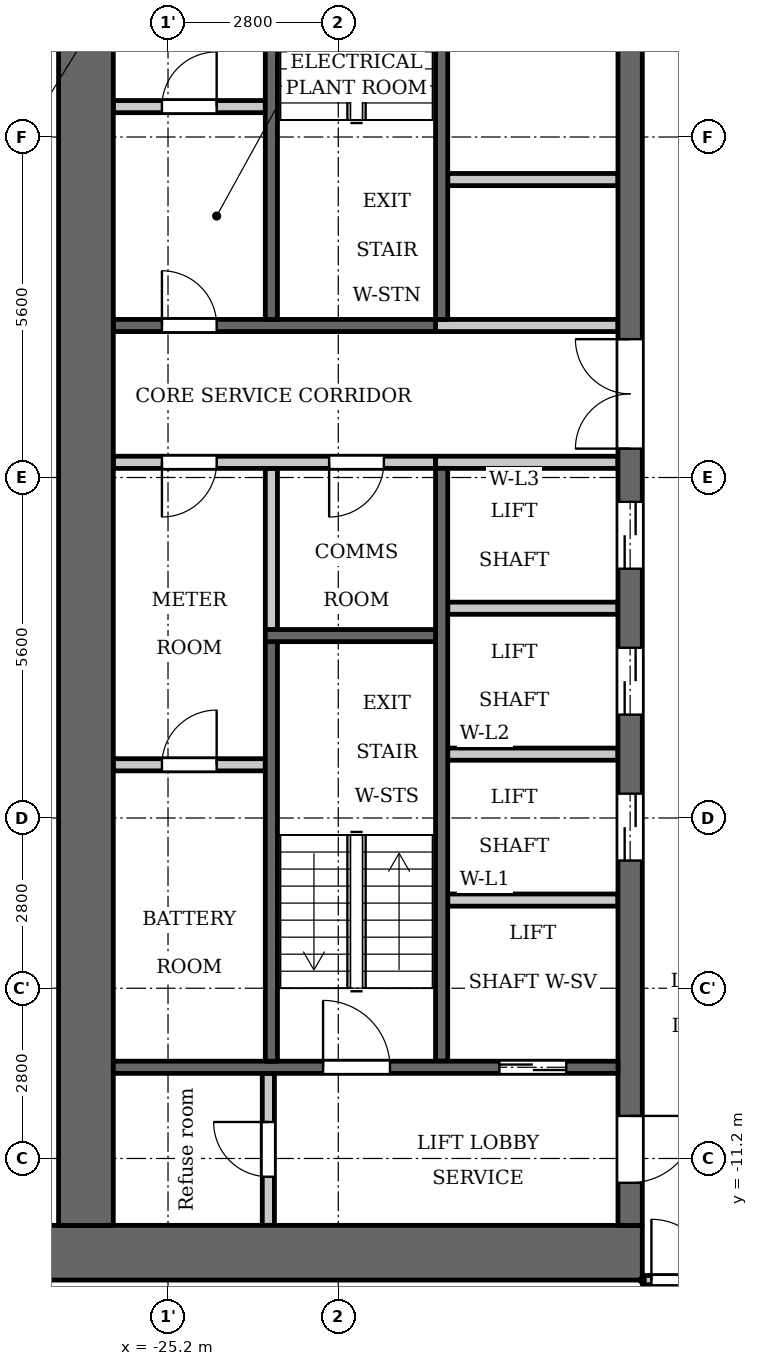
"""IFC4 building model, lengths in metres.
Left out: names, types, materials, properties, quantities, classifications, styles, units other than length and angle.
Written with IfcOpenShell. Run it as: python <this file> out.ifc"""

import sys

from ifc_helpers import new_model, si_unit, direction, frame, frame_2d, origin, place, context, subcontext, project, spatial, rectangle, extrude, element, fill, save


model = new_model("IFC4")
c1 = context("Model", 3, precision=1e-05, world=origin(), true_north=direction((0.0, 1.0)))
c2 = subcontext(c1, "Body", "Model", "MODEL_VIEW")
j1 = project(units=[si_unit("LENGTHUNIT", "METRE"), si_unit("PLANEANGLEUNIT", "RADIAN")], contexts=[c1])
p1 = place(None, origin())
s1 = spatial("IfcSite", under=j1, at=p1, CompositionType="ELEMENT")
p2 = place(p1, origin())
s2 = spatial("IfcBuilding", under=s1, at=p2, CompositionType="ELEMENT")
p3 = place(p2, frame((0.0, 0.0, 121.8)))
s3 = spatial("IfcBuildingStorey", under=s2, at=p3, CompositionType="ELEMENT", Elevation=121.8)
p4 = place(p3, frame((-23.5, -2.5, 0.0), z_axis=(0.0, 0.0, 1.0), x_axis=(0.0, 1.0, 0.0)))
e1 = element("IfcWall", 1, at=p4, inside=s3, PredefinedType="PARTITIONING", context=c2, shape_type="SweptSolid", body=[
    extrude(rectangle(XDim=2.65, YDim=0.2, at=frame_2d((1.325, 0.0))), origin(), (0.0, 0.0, 1.0), 3.15),
])
p5 = place(p3, frame((-20.7, 2.6, 0.0), z_axis=(0.0, 0.0, 1.0), x_axis=(0.0, 1.0, 0.0)))
e2 = element("IfcWall", 2, at=p5, inside=s3, PredefinedType="SHEAR", context=c2, shape_type="SweptSolid", body=[
    extrude(rectangle(XDim=7.0, YDim=0.2, at=frame_2d((3.5, 0.0))), origin(), (0.0, 0.0, 1.0), 3.15),
])
p6 = place(p3, frame((-20.7, -9.6, 0.0), z_axis=(0.0, 0.0, 1.0), x_axis=(0.0, 1.0, 0.0)))
e3 = element("IfcWall", 3, at=p6, inside=s3, PredefinedType="SHEAR", context=c2, shape_type="SweptSolid", body=[
    extrude(rectangle(XDim=9.75, YDim=0.2, at=frame_2d((4.875, 0.0))), origin(), (0.0, 0.0, 1.0), 3.15),
])
p7 = place(p3, frame((-20.8, 2.5, 0.0), z_axis=(0.0, 0.0, 1.0), x_axis=(-1.0, 0.0, 0.0)))
e4 = element("IfcWall", 4, at=p7, inside=s3, PredefinedType="SHEAR", context=c2, shape_type="SweptSolid", body=[
    extrude(rectangle(XDim=5.3, YDim=0.2, at=frame_2d((2.65, 0.0))), origin(), (0.0, 0.0, 1.0), 3.15),
])
p8 = place(p7, frame((3.6, 0.0, 0.0)))
e5 = element("IfcOpeningElement", 5, at=p8, cuts=e4, PredefinedType="OPENING", context=c2, shape_type="SweptSolid", body=[
    extrude(rectangle(XDim=0.9, YDim=2.1, at=frame_2d((0.45, 1.05))), frame((0.0, 0.11, 0.0), z_axis=(0.0, -1.0, 0.0), x_axis=(1.0, 0.0, 0.0)), (0.0, 0.0, 1.0), 0.22),
])
p9 = place(p3, frame((-20.8, 0.25, 0.0), z_axis=(0.0, 0.0, 1.0), x_axis=(-1.0, 0.0, 0.0)))
e6 = element("IfcWall", 6, at=p9, inside=s3, PredefinedType="PARTITIONING", context=c2, shape_type="SweptSolid", body=[
    extrude(rectangle(XDim=5.3, YDim=0.2, at=frame_2d((2.65, 0.0))), origin(), (0.0, 0.0, 1.0), 3.15),
])
p10 = place(p9, frame((0.85, 0.0, 0.0)))
e7 = element("IfcOpeningElement", 7, at=p10, cuts=e6, PredefinedType="OPENING", context=c2, shape_type="SweptSolid", body=[
    extrude(rectangle(XDim=0.9, YDim=2.1, at=frame_2d((0.45, 1.05))), frame((0.0, 0.11, 0.0), z_axis=(0.0, -1.0, 0.0), x_axis=(1.0, 0.0, 0.0)), (0.0, 0.0, 1.0), 0.22),
])
p11 = place(p9, frame((3.6, 0.0, 0.0)))
e8 = element("IfcOpeningElement", 8, at=p11, cuts=e6, PredefinedType="OPENING", context=c2, shape_type="SweptSolid", body=[
    extrude(rectangle(XDim=0.9, YDim=2.1, at=frame_2d((0.45, 1.05))), frame((0.0, 0.11, 0.0), z_axis=(0.0, -1.0, 0.0), x_axis=(1.0, 0.0, 0.0)), (0.0, 0.0, 1.0), 0.22),
])
p12 = place(p3, frame((-17.4, -12.75, 0.0), z_axis=(0.0, 0.0, 1.0), x_axis=(-1.0, 0.0, 0.0)))
e9 = element("IfcWall", 9, at=p12, inside=s3, PredefinedType="SHEAR", context=c2, shape_type="SweptSolid", body=[
    extrude(rectangle(XDim=10.4, YDim=0.9, at=frame_2d((5.2, 0.0))), origin(), (0.0, 0.0, 1.0), 3.15),
])
p13 = place(p3, frame((-17.6, -12.3, 0.0), z_axis=(0.0, 0.0, 1.0), x_axis=(0.0, 1.0, 0.0)))
e10 = element("IfcWall", 10, at=p13, inside=s3, PredefinedType="SHEAR", context=c2, shape_type="SweptSolid", body=[
    extrude(rectangle(XDim=24.6, YDim=0.4, at=frame_2d((12.3, 0.0))), origin(), (0.0, 0.0, 1.0), 3.15),
])
p14 = place(p13, frame((6.0, 0.0, 0.0)))
e11 = element("IfcOpeningElement", 11, at=p14, cuts=e10, PredefinedType="OPENING", context=c2, shape_type="SweptSolid", body=[
    extrude(rectangle(XDim=1.1, YDim=2.1, at=frame_2d((0.55, 1.05))), frame((0.0, 0.21, 0.0), z_axis=(0.0, -1.0, 0.0), x_axis=(1.0, 0.0, 0.0)), (0.0, 0.0, 1.0), 0.42),
])
p15 = place(p13, frame((8.4, 0.0, 0.0)))
e12 = element("IfcOpeningElement", 12, at=p15, cuts=e10, PredefinedType="OPENING", context=c2, shape_type="SweptSolid", body=[
    extrude(rectangle(XDim=1.1, YDim=2.1, at=frame_2d((0.55, 1.05))), frame((0.0, 0.21, 0.0), z_axis=(0.0, -1.0, 0.0), x_axis=(1.0, 0.0, 0.0)), (0.0, 0.0, 1.0), 0.42),
])
p16 = place(p13, frame((10.8, 0.0, 0.0)))
e13 = element("IfcOpeningElement", 13, at=p16, cuts=e10, PredefinedType="OPENING", context=c2, shape_type="SweptSolid", body=[
    extrude(rectangle(XDim=1.1, YDim=2.1, at=frame_2d((0.55, 1.05))), frame((0.0, 0.21, 0.0), z_axis=(0.0, -1.0, 0.0), x_axis=(1.0, 0.0, 0.0)), (0.0, 0.0, 1.0), 0.42),
])
p17 = place(p13, frame((22.8, 0.0, 0.0)))
e14 = element("IfcOpeningElement", 14, at=p17, cuts=e10, PredefinedType="OPENING", context=c2, shape_type="SweptSolid", body=[
    extrude(rectangle(XDim=1.1, YDim=2.1, at=frame_2d((0.55, 1.05))), frame((0.0, 0.21, 0.0), z_axis=(0.0, -1.0, 0.0), x_axis=(1.0, 0.0, 0.0)), (0.0, 0.0, 1.0), 0.42),
])
p18 = place(p13, frame((0.7, 0.0, 0.0)))
e15 = element("IfcOpeningElement", 15, at=p18, cuts=e10, PredefinedType="OPENING", context=c2, shape_type="SweptSolid", body=[
    extrude(rectangle(XDim=1.1, YDim=2.1, at=frame_2d((0.55, 1.05))), frame((0.0, 0.21, 0.0), z_axis=(0.0, -1.0, 0.0), x_axis=(1.0, 0.0, 0.0)), (0.0, 0.0, 1.0), 0.42),
])
p19 = place(p13, frame((12.775, 0.0, 0.0)))
e16 = element("IfcOpeningElement", 16, at=p19, cuts=e10, PredefinedType="OPENING", context=c2, shape_type="SweptSolid", body=[
    extrude(rectangle(XDim=1.8, YDim=2.1, at=frame_2d((0.9, 1.05))), frame((0.0, 0.21, 0.0), z_axis=(0.0, -1.0, 0.0), x_axis=(1.0, 0.0, 0.0)), (0.0, 0.0, 1.0), 0.42),
])
p20 = place(p3, frame((-26.55, -12.3, 0.0), z_axis=(0.0, 0.0, 1.0), x_axis=(0.0, 1.0, 0.0)))
e17 = element("IfcWall", 17, at=p20, inside=s3, PredefinedType="SHEAR", context=c2, shape_type="SweptSolid", body=[
    extrude(rectangle(XDim=24.6, YDim=0.9, at=frame_2d((12.3, 0.0))), origin(), (0.0, 0.0, 1.0), 3.15),
])
p21 = place(p3, frame((-23.55, -12.3, 0.0), z_axis=(0.0, 0.0, 1.0), x_axis=(0.0, 1.0, 0.0)))
e18 = element("IfcWall", 18, at=p21, inside=s3, PredefinedType="PARTITIONING", context=c2, shape_type="SweptSolid", body=[
    extrude(rectangle(XDim=2.5, YDim=0.2, at=frame_2d((1.25, 0.0))), origin(), (0.0, 0.0, 1.0), 3.15),
])
p22 = place(p21, frame((0.8, 0.0, 0.0)))
e19 = element("IfcOpeningElement", 19, at=p22, cuts=e18, PredefinedType="OPENING", context=c2, shape_type="SweptSolid", body=[
    extrude(rectangle(XDim=0.9, YDim=2.1, at=frame_2d((0.45, 1.05))), frame((0.0, 0.11, 0.0), z_axis=(0.0, -1.0, 0.0), x_axis=(1.0, 0.0, 0.0)), (0.0, 0.0, 1.0), 0.22),
])
p23 = place(p3, frame((-23.6, -4.725, 0.0), z_axis=(0.0, 0.0, 1.0), x_axis=(-1.0, 0.0, 0.0)))
e20 = element("IfcWall", 20, at=p23, inside=s3, PredefinedType="PARTITIONING", context=c2, shape_type="SweptSolid", body=[
    extrude(rectangle(XDim=2.5, YDim=0.2, at=frame_2d((1.25, 0.0))), origin(), (0.0, 0.0, 1.0), 3.15),
])
p24 = place(p23, frame((0.8, 0.0, 0.0)))
e21 = element("IfcOpeningElement", 21, at=p24, cuts=e20, PredefinedType="OPENING", context=c2, shape_type="SweptSolid", body=[
    extrude(rectangle(XDim=0.9, YDim=2.1, at=frame_2d((0.45, 1.05))), frame((0.0, 0.11, 0.0), z_axis=(0.0, -1.0, 0.0), x_axis=(1.0, 0.0, 0.0)), (0.0, 0.0, 1.0), 0.22),
])
p25 = place(p3, frame((-23.6, 6.1, 0.0), z_axis=(0.0, 0.0, 1.0), x_axis=(-1.0, 0.0, 0.0)))
e22 = element("IfcWall", 22, at=p25, inside=s3, PredefinedType="PARTITIONING", context=c2, shape_type="SweptSolid", body=[
    extrude(rectangle(XDim=2.5, YDim=0.2, at=frame_2d((1.25, 0.0))), origin(), (0.0, 0.0, 1.0), 3.15),
])
p26 = place(p25, frame((0.8, 0.0, 0.0)))
e23 = element("IfcOpeningElement", 23, at=p26, cuts=e22, PredefinedType="OPENING", context=c2, shape_type="SweptSolid", body=[
    extrude(rectangle(XDim=0.9, YDim=2.1, at=frame_2d((0.45, 1.05))), frame((0.0, 0.11, 0.0), z_axis=(0.0, -1.0, 0.0), x_axis=(1.0, 0.0, 0.0)), (0.0, 0.0, 1.0), 0.22),
])
p27 = place(p3, frame((-17.8, -9.7, 0.0), z_axis=(0.0, 0.0, 1.0), x_axis=(-1.0, 0.0, 0.0)))
e24 = element("IfcWall", 24, at=p27, inside=s3, PredefinedType="SHEAR", context=c2, shape_type="SweptSolid", body=[
    extrude(rectangle(XDim=8.3, YDim=0.2, at=frame_2d((4.15, 0.0))), origin(), (0.0, 0.0, 1.0), 3.15),
])
p28 = place(p27, frame((0.85, 0.0, 0.0)))
e25 = element("IfcOpeningElement", 25, at=p28, cuts=e24, PredefinedType="OPENING", context=c2, shape_type="SweptSolid", body=[
    extrude(rectangle(XDim=1.1, YDim=2.1, at=frame_2d((0.55, 1.05))), frame((0.0, 0.11, 0.0), z_axis=(0.0, -1.0, 0.0), x_axis=(1.0, 0.0, 0.0)), (0.0, 0.0, 1.0), 0.22),
])
p29 = place(p27, frame((3.75, 0.0, 0.0)))
e26 = element("IfcOpeningElement", 26, at=p29, cuts=e24, PredefinedType="OPENING", context=c2, shape_type="SweptSolid", body=[
    extrude(rectangle(XDim=1.1, YDim=2.1, at=frame_2d((0.55, 1.05))), frame((0.0, 0.11, 0.0), z_axis=(0.0, -1.0, 0.0), x_axis=(1.0, 0.0, 0.0)), (0.0, 0.0, 1.0), 0.22),
])
for number, where, z_axis, x_axis in (
    (27, (-17.8, -6.95, 0.0), (0.0, 0.0, 1.0), (-1.0, 0.0, 0.0)),
    (28, (-17.8, -4.55, 0.0), (0.0, 0.0, 1.0), (-1.0, 0.0, 0.0)),
    (29, (-17.8, -2.15, 0.0), (0.0, 0.0, 1.0), (-1.0, 0.0, 0.0)),
):
    element("IfcWall", number, at=place(p3, frame(where, z_axis=z_axis, x_axis=x_axis)), inside=s3, PredefinedType="PARTITIONING", context=c2, shape_type="SweptSolid", body=[
        extrude(rectangle(XDim=2.8, YDim=0.2, at=frame_2d((1.4, 0.0))), origin(), (0.0, 0.0, 1.0), 3.15),
    ])
for number, where, z_axis, x_axis in (
    (30, (-17.8, 0.25, 0.0), (0.0, 0.0, 1.0), (-1.0, 0.0, 0.0)),
    (31, (-17.8, 2.5, 0.0), (0.0, 0.0, 1.0), (-1.0, 0.0, 0.0)),
):
    element("IfcWall", number, at=place(p3, frame(where, z_axis=z_axis, x_axis=x_axis)), inside=s3, PredefinedType="PARTITIONING", context=c2, shape_type="SweptSolid", body=[
        extrude(rectangle(XDim=3.0, YDim=0.2, at=frame_2d((1.5, 0.0))), origin(), (0.0, 0.0, 1.0), 3.15),
    ])
p30 = place(p3, frame((-17.8, 4.9, 0.0), z_axis=(0.0, 0.0, 1.0), x_axis=(-1.0, 0.0, 0.0)))
e32 = element("IfcWall", 32, at=p30, inside=s3, PredefinedType="PARTITIONING", context=c2, shape_type="SweptSolid", body=[
    extrude(rectangle(XDim=2.8, YDim=0.2, at=frame_2d((1.4, 0.0))), origin(), (0.0, 0.0, 1.0), 3.15),
])
p31 = place(p3, frame((-23.5, 2.6, 0.0), z_axis=(0.0, 0.0, 1.0), x_axis=(0.0, 1.0, 0.0)))
e33 = element("IfcWall", 33, at=p31, inside=s3, PredefinedType="SHEAR", context=c2, shape_type="SweptSolid", body=[
    extrude(rectangle(XDim=7.0, YDim=0.2, at=frame_2d((3.5, 0.0))), origin(), (0.0, 0.0, 1.0), 3.15),
])
p32 = place(p3, frame((-23.5, -9.6, 0.0), z_axis=(0.0, 0.0, 1.0), x_axis=(0.0, 1.0, 0.0)))
e34 = element("IfcWall", 34, at=p32, inside=s3, PredefinedType="SHEAR", context=c2, shape_type="SweptSolid", body=[
    extrude(rectangle(XDim=6.9, YDim=0.2, at=frame_2d((3.45, 0.0))), origin(), (0.0, 0.0, 1.0), 3.15),
])
p33 = place(p3, frame((-20.8, -2.6, 0.0), z_axis=(0.0, 0.0, 1.0), x_axis=(-1.0, 0.0, 0.0)))
e35 = element("IfcWall", 35, at=p33, inside=s3, PredefinedType="SHEAR", context=c2, shape_type="SweptSolid", body=[
    extrude(rectangle(XDim=2.8, YDim=0.2, at=frame_2d((1.4, 0.0))), origin(), (0.0, 0.0, 1.0), 3.15),
])
p34 = place(p3, frame((-17.4, -13.2, 0.0), z_axis=(0.0, 0.0, 1.0), x_axis=(1.0, 0.0, 0.0)))
e36 = element("IfcWall", 36, at=p34, inside=s3, PredefinedType="PARTITIONING", context=c2, shape_type="SweptSolid", body=[
    extrude(rectangle(XDim=34.8, YDim=0.15, at=frame_2d((17.4, 0.0))), origin(), (0.0, 0.0, 1.0), 3.15),
])
p35 = place(p34, frame((0.15, 0.0, 0.0)))
e37 = element("IfcOpeningElement", 37, at=p35, cuts=e36, PredefinedType="OPENING", context=c2, shape_type="SweptSolid", body=[
    extrude(rectangle(XDim=1.0, YDim=2.1, at=frame_2d((0.5, 1.05))), frame((0.0, 0.085, 0.0), z_axis=(0.0, -1.0, 0.0), x_axis=(1.0, 0.0, 0.0)), (0.0, 0.0, 1.0), 0.17),
])
p36 = place(p34, frame((33.55, 0.0, 0.0)))
e38 = element("IfcOpeningElement", 38, at=p36, cuts=e36, PredefinedType="OPENING", context=c2, shape_type="SweptSolid", body=[
    extrude(rectangle(XDim=1.0, YDim=2.1, at=frame_2d((0.5, 1.05))), frame((0.0, 0.085, 0.0), z_axis=(0.0, -1.0, 0.0), x_axis=(1.0, 0.0, 0.0)), (0.0, 0.0, 1.0), 0.17),
])
p37 = place(p34, frame((10.1, 0.0, 0.0)))
e39 = element("IfcOpeningElement", 39, at=p37, cuts=e36, PredefinedType="OPENING", context=c2, shape_type="SweptSolid", body=[
    extrude(rectangle(XDim=1.0, YDim=2.1, at=frame_2d((0.5, 1.05))), frame((0.0, 0.085, 0.0), z_axis=(0.0, -1.0, 0.0), x_axis=(1.0, 0.0, 0.0)), (0.0, 0.0, 1.0), 0.17),
])
p38 = place(p34, frame((15.7, 0.0, 0.0)))
e40 = element("IfcOpeningElement", 40, at=p38, cuts=e36, PredefinedType="OPENING", context=c2, shape_type="SweptSolid", body=[
    extrude(rectangle(XDim=1.0, YDim=2.1, at=frame_2d((0.5, 1.05))), frame((0.0, 0.085, 0.0), z_axis=(0.0, -1.0, 0.0), x_axis=(1.0, 0.0, 0.0)), (0.0, 0.0, 1.0), 0.17),
])
p39 = place(p34, frame((24.9, 0.0, 0.0)))
e41 = element("IfcOpeningElement", 41, at=p39, cuts=e36, PredefinedType="OPENING", context=c2, shape_type="SweptSolid", body=[
    extrude(rectangle(XDim=1.0, YDim=2.1, at=frame_2d((0.5, 1.05))), frame((0.0, 0.085, 0.0), z_axis=(0.0, -1.0, 0.0), x_axis=(1.0, 0.0, 0.0)), (0.0, 0.0, 1.0), 0.17),
])
p40 = place(p28, origin())
e42 = element("IfcDoor", 42, at=p40, inside=s3, OperationType="DOUBLE_DOOR_SLIDING", PredefinedType="DOOR", context=c2, shape_type="SweptSolid", body=[
    extrude(rectangle(XDim=1.1, YDim=2.1, at=frame_2d((0.55, 1.05))), frame((0.0, 0.025, 0.0), z_axis=(0.0, -1.0, 0.0), x_axis=(1.0, 0.0, 0.0)), (0.0, 0.0, 1.0), 0.05),
])
fill(e25, e42)
p41 = place(p14, origin())
e43 = element("IfcDoor", 43, at=p41, inside=s3, OperationType="DOUBLE_DOOR_SLIDING", PredefinedType="DOOR", context=c2, shape_type="SweptSolid", body=[
    extrude(rectangle(XDim=1.1, YDim=2.1, at=frame_2d((0.55, 1.05))), frame((0.0, 0.025, 0.0), z_axis=(0.0, -1.0, 0.0), x_axis=(1.0, 0.0, 0.0)), (0.0, 0.0, 1.0), 0.05),
])
fill(e11, e43)
p42 = place(p15, origin())
e44 = element("IfcDoor", 44, at=p42, inside=s3, OperationType="DOUBLE_DOOR_SLIDING", PredefinedType="DOOR", context=c2, shape_type="SweptSolid", body=[
    extrude(rectangle(XDim=1.1, YDim=2.1, at=frame_2d((0.55, 1.05))), frame((0.0, 0.025, 0.0), z_axis=(0.0, -1.0, 0.0), x_axis=(1.0, 0.0, 0.0)), (0.0, 0.0, 1.0), 0.05),
])
fill(e12, e44)
p43 = place(p16, origin())
e45 = element("IfcDoor", 45, at=p43, inside=s3, OperationType="DOUBLE_DOOR_SLIDING", PredefinedType="DOOR", context=c2, shape_type="SweptSolid", body=[
    extrude(rectangle(XDim=1.1, YDim=2.1, at=frame_2d((0.55, 1.05))), frame((0.0, 0.025, 0.0), z_axis=(0.0, -1.0, 0.0), x_axis=(1.0, 0.0, 0.0)), (0.0, 0.0, 1.0), 0.05),
])
fill(e13, e45)
p44 = place(p18, origin())
e46 = element("IfcDoor", 46, at=p44, inside=s3, OperationType="SINGLE_SWING_RIGHT", PredefinedType="DOOR", context=c2, shape_type="SweptSolid", body=[
    extrude(rectangle(XDim=1.1, YDim=2.1, at=frame_2d((0.55, 1.05))), frame((0.0, 0.025, 0.0), z_axis=(0.0, -1.0, 0.0), x_axis=(1.0, 0.0, 0.0)), (0.0, 0.0, 1.0), 0.05),
])
fill(e15, e46)
p45 = place(p22, origin())
e47 = element("IfcDoor", 47, at=p45, inside=s3, OperationType="SINGLE_SWING_LEFT", PredefinedType="DOOR", context=c2, shape_type="SweptSolid", body=[
    extrude(rectangle(XDim=0.9, YDim=2.1, at=frame_2d((0.45, 1.05))), frame((0.0, 0.025, 0.0), z_axis=(0.0, -1.0, 0.0), x_axis=(1.0, 0.0, 0.0)), (0.0, 0.0, 1.0), 0.05),
])
fill(e19, e47)
p46 = place(p29, origin())
e48 = element("IfcDoor", 48, at=p46, inside=s3, OperationType="SINGLE_SWING_RIGHT", PredefinedType="DOOR", context=c2, shape_type="SweptSolid", body=[
    extrude(rectangle(XDim=1.1, YDim=2.1, at=frame_2d((0.55, 1.05))), frame((0.0, 0.025, 0.0), z_axis=(0.0, -1.0, 0.0), x_axis=(1.0, 0.0, 0.0)), (0.0, 0.0, 1.0), 0.05),
])
fill(e26, e48)
p47 = place(p19, origin())
e49 = element("IfcDoor", 49, at=p47, inside=s3, OperationType="DOUBLE_DOOR_SINGLE_SWING", PredefinedType="DOOR", context=c2, shape_type="SweptSolid", body=[
    extrude(rectangle(XDim=1.8, YDim=2.1, at=frame_2d((0.9, 1.05))), frame((0.0, 0.025, 0.0), z_axis=(0.0, -1.0, 0.0), x_axis=(1.0, 0.0, 0.0)), (0.0, 0.0, 1.0), 0.05),
])
fill(e16, e49)
p48 = place(p10, origin())
e50 = element("IfcDoor", 50, at=p48, inside=s3, OperationType="SINGLE_SWING_LEFT", PredefinedType="DOOR", context=c2, shape_type="SweptSolid", body=[
    extrude(rectangle(XDim=0.9, YDim=2.1, at=frame_2d((0.45, 1.05))), frame((0.0, 0.025, 0.0), z_axis=(0.0, -1.0, 0.0), x_axis=(1.0, 0.0, 0.0)), (0.0, 0.0, 1.0), 0.05),
])
fill(e7, e50)
p49 = place(p24, origin())
e51 = element("IfcDoor", 51, at=p49, inside=s3, OperationType="SINGLE_SWING_LEFT", PredefinedType="DOOR", context=c2, shape_type="SweptSolid", body=[
    extrude(rectangle(XDim=0.9, YDim=2.1, at=frame_2d((0.45, 1.05))), frame((0.0, 0.025, 0.0), z_axis=(0.0, -1.0, 0.0), x_axis=(1.0, 0.0, 0.0)), (0.0, 0.0, 1.0), 0.05),
])
fill(e21, e51)
p50 = place(p11, origin())
e52 = element("IfcDoor", 52, at=p50, inside=s3, OperationType="SINGLE_SWING_LEFT", PredefinedType="DOOR", context=c2, shape_type="SweptSolid", body=[
    extrude(rectangle(XDim=0.9, YDim=2.1, at=frame_2d((0.45, 1.05))), frame((0.0, 0.025, 0.0), z_axis=(0.0, -1.0, 0.0), x_axis=(1.0, 0.0, 0.0)), (0.0, 0.0, 1.0), 0.05),
])
fill(e8, e52)
p51 = place(p26, origin())
e53 = element("IfcDoor", 53, at=p51, inside=s3, OperationType="SINGLE_SWING_LEFT", PredefinedType="DOOR", context=c2, shape_type="SweptSolid", body=[
    extrude(rectangle(XDim=0.9, YDim=2.1, at=frame_2d((0.45, 1.05))), frame((0.0, 0.025, 0.0), z_axis=(0.0, -1.0, 0.0), x_axis=(1.0, 0.0, 0.0)), (0.0, 0.0, 1.0), 0.05),
])
fill(e23, e53)
p52 = place(p8, origin())
e54 = element("IfcDoor", 54, at=p52, inside=s3, OperationType="SINGLE_SWING_RIGHT", PredefinedType="DOOR", context=c2, shape_type="SweptSolid", body=[
    extrude(rectangle(XDim=0.9, YDim=2.1, at=frame_2d((0.45, 1.05))), frame((0.0, 0.025, 0.0), z_axis=(0.0, -1.0, 0.0), x_axis=(1.0, 0.0, 0.0)), (0.0, 0.0, 1.0), 0.05),
])
fill(e5, e54)
p53 = place(p35, origin())
e55 = element("IfcDoor", 55, at=p53, inside=s3, OperationType="SINGLE_SWING_RIGHT", PredefinedType="DOOR", context=c2, shape_type="SweptSolid", body=[
    extrude(rectangle(XDim=1.0, YDim=2.1, at=frame_2d((0.5, 1.05))), frame((0.0, 0.025, 0.0), z_axis=(0.0, -1.0, 0.0), x_axis=(1.0, 0.0, 0.0)), (0.0, 0.0, 1.0), 0.05),
])
fill(e37, e55)
save(model, sys.argv[1])
